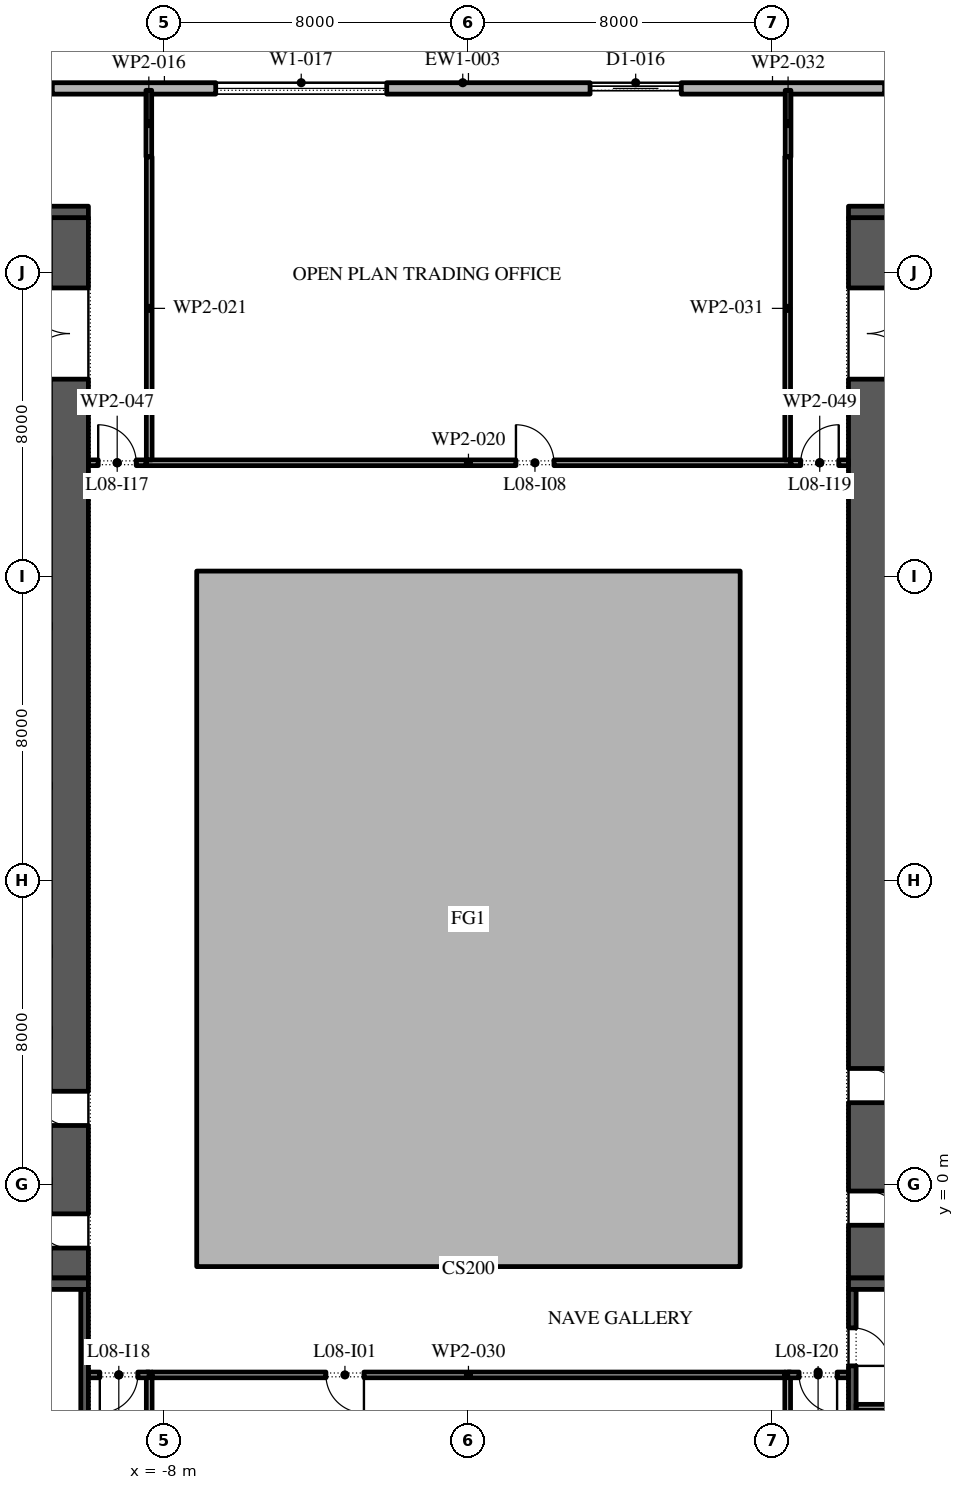
"""IFC4 building model, lengths in metres.
Left out: names, types, materials, properties, quantities, classifications, styles, units other than length and angle.
Written with IfcOpenShell. Run it as: python <this file> out.ifc"""

import sys

from ifc_helpers import new_model, si_unit, direction, frame, frame_2d, origin, place, context, subcontext, project, spatial, polyline, rectangle, outline, extrude, element, fill, save


model = new_model("IFC4")
c1 = context("Model", 3, precision=1e-05, world=origin(), true_north=direction((0.0, 1.0)))
c2 = subcontext(c1, "Body", "Model", "MODEL_VIEW")
j1 = project(units=[si_unit("LENGTHUNIT", "METRE"), si_unit("PLANEANGLEUNIT", "RADIAN")], contexts=[c1])
p1 = place(None, origin())
s1 = spatial("IfcSite", under=j1, at=p1, CompositionType="ELEMENT")
p2 = place(p1, origin())
s2 = spatial("IfcBuilding", under=s1, at=p2, CompositionType="ELEMENT")
p3 = place(p2, frame((0.0, 0.0, 43.8)))
s3 = spatial("IfcBuildingStorey", under=s2, at=p3, CompositionType="ELEMENT", Elevation=43.8)
p4 = place(p3, origin())
e1 = element("IfcWall", 1, at=p4, inside=s3, PredefinedType="STANDARD", context=c2, shape_type="SweptSolid", body=[
    extrude(outline(polyline([(-7.15, -2.15), (7.15, -2.15), (7.15, 16.15), (-7.15, 16.15), (-7.15, -2.15)]), holes=[polyline([(-7.0, -2.0), (-7.0, 16.0), (7.0, 16.0), (7.0, -2.0), (-7.0, -2.0)])]), origin(), (0.0, 0.0, 1.0), 4.0),
])
p5 = place(p3, frame((26.1, 28.85, 0.0), z_axis=(0.0, 0.0, 1.0), x_axis=(-1.0, 0.0, 0.0)))
e2 = element("IfcWall", 2, at=p5, inside=s3, PredefinedType="STANDARD", context=c2, shape_type="SweptSolid", body=[
    extrude(rectangle(XDim=52.5, YDim=0.3, at=frame_2d((26.25, 0.0))), origin(), (0.0, 0.0, 1.0), 4.0),
])
p6 = place(p5, frame((2.0, 0.0, 0.45)))
e3 = element("IfcOpeningElement", 3, at=p6, cuts=e2, PredefinedType="OPENING", context=c2, shape_type="SweptSolid", body=[
    extrude(rectangle(XDim=4.5, YDim=3.05, at=frame_2d((2.25, 1.525))), frame((0.0, 0.16, 0.0), z_axis=(0.0, -1.0, 0.0), x_axis=(1.0, 0.0, 0.0)), (0.0, 0.0, 1.0), 0.32),
])
p7 = place(p5, frame((10.65, 0.0, 0.45)))
e4 = element("IfcOpeningElement", 4, at=p7, cuts=e2, PredefinedType="OPENING", context=c2, shape_type="SweptSolid", body=[
    extrude(rectangle(XDim=4.5, YDim=3.05, at=frame_2d((2.25, 1.525))), frame((0.0, 0.16, 0.0), z_axis=(0.0, -1.0, 0.0), x_axis=(1.0, 0.0, 0.0)), (0.0, 0.0, 1.0), 0.32),
])
p8 = place(p5, frame((20.5, 0.0, 0.0)))
e5 = element("IfcOpeningElement", 5, at=p8, cuts=e2, PredefinedType="OPENING", context=c2, shape_type="SweptSolid", body=[
    extrude(rectangle(XDim=2.4, YDim=3.5, at=frame_2d((1.2, 1.75))), frame((0.0, 0.16, 0.0), z_axis=(0.0, -1.0, 0.0), x_axis=(1.0, 0.0, 0.0)), (0.0, 0.0, 1.0), 0.32),
])
p9 = place(p5, frame((28.25, 0.0, 0.45)))
e6 = element("IfcOpeningElement", 6, at=p9, cuts=e2, PredefinedType="OPENING", context=c2, shape_type="SweptSolid", body=[
    extrude(rectangle(XDim=4.5, YDim=3.05, at=frame_2d((2.25, 1.525))), frame((0.0, 0.16, 0.0), z_axis=(0.0, -1.0, 0.0), x_axis=(1.0, 0.0, 0.0)), (0.0, 0.0, 1.0), 0.32),
])
p10 = place(p5, frame((37.05, 0.0, 0.45)))
e7 = element("IfcOpeningElement", 7, at=p10, cuts=e2, PredefinedType="OPENING", context=c2, shape_type="SweptSolid", body=[
    extrude(rectangle(XDim=4.5, YDim=3.05, at=frame_2d((2.25, 1.525))), frame((0.0, 0.16, 0.0), z_axis=(0.0, -1.0, 0.0), x_axis=(1.0, 0.0, 0.0)), (0.0, 0.0, 1.0), 0.32),
])
p11 = place(p5, frame((45.85, 0.0, 0.45)))
e8 = element("IfcOpeningElement", 8, at=p11, cuts=e2, PredefinedType="OPENING", context=c2, shape_type="SweptSolid", body=[
    extrude(rectangle(XDim=4.5, YDim=3.05, at=frame_2d((2.25, 1.525))), frame((0.0, 0.16, 0.0), z_axis=(0.0, -1.0, 0.0), x_axis=(1.0, 0.0, 0.0)), (0.0, 0.0, 1.0), 0.32),
])
p12 = place(p3, frame((-10.5, -2.45, 0.0), z_axis=(0.0, 0.0, 1.0), x_axis=(0.0, 1.0, 0.0)))
e9 = element("IfcWall", 9, at=p12, inside=s3, PredefinedType="SHEAR", context=c2, shape_type="SweptSolid", body=[
    extrude(rectangle(XDim=27.9, YDim=1.0, at=frame_2d((13.95, 0.0))), origin(), (0.0, 0.0, 1.0), 4.0),
])
p13 = place(p12, frame((23.65, 0.0, 0.0)))
e10 = element("IfcOpeningElement", 10, at=p13, cuts=e9, PredefinedType="OPENING", context=c2, shape_type="SweptSolid", body=[
    extrude(rectangle(XDim=2.4, YDim=2.1, at=frame_2d((1.2, 1.05))), frame((0.0, 0.51, 0.0), z_axis=(0.0, -1.0, 0.0), x_axis=(1.0, 0.0, 0.0)), (0.0, 0.0, 1.0), 1.02),
])
p14 = place(p12, frame((0.788, 0.0, 0.0)))
e11 = element("IfcOpeningElement", 11, at=p14, cuts=e9, PredefinedType="OPENING", context=c2, shape_type="SweptSolid", body=[
    extrude(rectangle(XDim=0.9, YDim=2.1, at=frame_2d((0.45, 1.05))), frame((0.0, 0.51, 0.0), z_axis=(0.0, -1.0, 0.0), x_axis=(1.0, 0.0, 0.0)), (0.0, 0.0, 1.0), 1.02),
])
p15 = place(p12, frame((4.012, 0.0, 0.0)))
e12 = element("IfcOpeningElement", 12, at=p15, cuts=e9, PredefinedType="OPENING", context=c2, shape_type="SweptSolid", body=[
    extrude(rectangle(XDim=0.9, YDim=2.1, at=frame_2d((0.45, 1.05))), frame((0.0, 0.51, 0.0), z_axis=(0.0, -1.0, 0.0), x_axis=(1.0, 0.0, 0.0)), (0.0, 0.0, 1.0), 1.02),
])
for number, where, z_axis, x_axis in (
    (13, (-22.0, -2.6, 0.0), (0.0, 0.0, 1.0), (1.0, 0.0, 0.0)),
    (14, (-22.0, 25.6, 0.0), (0.0, 0.0, 1.0), (1.0, 0.0, 0.0)),
):
    element("IfcWall", number, at=place(p3, frame(where, z_axis=z_axis, x_axis=x_axis)), inside=s3, PredefinedType="SHEAR", context=c2, shape_type="SweptSolid", body=[
        extrude(rectangle(XDim=12.0, YDim=0.3, at=frame_2d((6.0, 0.0))), origin(), (0.0, 0.0, 1.0), 4.0),
    ])
p16 = place(p3, frame((-10.1, -15.8, 0.0), z_axis=(0.0, 0.0, 1.0), x_axis=(0.0, 1.0, 0.0)))
e15 = element("IfcWall", 15, at=p16, inside=s3, PredefinedType="SHEAR", context=c2, shape_type="SweptSolid", body=[
    extrude(rectangle(XDim=13.05, YDim=0.2, at=frame_2d((6.525, 0.0))), origin(), (0.0, 0.0, 1.0), 4.0),
])
p17 = place(p16, frame((6.075, 0.0, 0.0)))
e16 = element("IfcOpeningElement", 16, at=p17, cuts=e15, PredefinedType="OPENING", context=c2, shape_type="SweptSolid", body=[
    extrude(rectangle(XDim=0.9, YDim=2.1, at=frame_2d((0.45, 1.05))), frame((0.0, 0.11, 0.0), z_axis=(0.0, -1.0, 0.0), x_axis=(1.0, 0.0, 0.0)), (0.0, 0.0, 1.0), 0.22),
])
p18 = place(p3, frame((10.5, -2.45, 0.0), z_axis=(0.0, 0.0, 1.0), x_axis=(0.0, 1.0, 0.0)))
e17 = element("IfcWall", 17, at=p18, inside=s3, PredefinedType="SHEAR", context=c2, shape_type="SweptSolid", body=[
    extrude(rectangle(XDim=27.9, YDim=1.0, at=frame_2d((13.95, 0.0))), origin(), (0.0, 0.0, 1.0), 4.0),
])
p19 = place(p18, frame((23.65, 0.0, 0.0)))
e18 = element("IfcOpeningElement", 18, at=p19, cuts=e17, PredefinedType="OPENING", context=c2, shape_type="SweptSolid", body=[
    extrude(rectangle(XDim=2.4, YDim=2.1, at=frame_2d((1.2, 1.05))), frame((0.0, 0.51, 0.0), z_axis=(0.0, -1.0, 0.0), x_axis=(1.0, 0.0, 0.0)), (0.0, 0.0, 1.0), 1.02),
])
p20 = place(p18, frame((1.387, 0.0, 0.0)))
e19 = element("IfcOpeningElement", 19, at=p20, cuts=e17, PredefinedType="OPENING", context=c2, shape_type="SweptSolid", body=[
    extrude(rectangle(XDim=0.9, YDim=2.1, at=frame_2d((0.45, 1.05))), frame((0.0, 0.51, 0.0), z_axis=(0.0, -1.0, 0.0), x_axis=(1.0, 0.0, 0.0)), (0.0, 0.0, 1.0), 1.02),
])
p21 = place(p18, frame((4.613, 0.0, 0.0)))
e20 = element("IfcOpeningElement", 20, at=p21, cuts=e17, PredefinedType="OPENING", context=c2, shape_type="SweptSolid", body=[
    extrude(rectangle(XDim=0.9, YDim=2.1, at=frame_2d((0.45, 1.05))), frame((0.0, 0.51, 0.0), z_axis=(0.0, -1.0, 0.0), x_axis=(1.0, 0.0, 0.0)), (0.0, 0.0, 1.0), 1.02),
])
for number, where, z_axis, x_axis in (
    (21, (10.0, -2.6, 0.0), (0.0, 0.0, 1.0), (1.0, 0.0, 0.0)),
    (22, (10.0, 25.6, 0.0), (0.0, 0.0, 1.0), (1.0, 0.0, 0.0)),
):
    element("IfcWall", number, at=place(p3, frame(where, z_axis=z_axis, x_axis=x_axis)), inside=s3, PredefinedType="SHEAR", context=c2, shape_type="SweptSolid", body=[
        extrude(rectangle(XDim=12.0, YDim=0.3, at=frame_2d((6.0, 0.0))), origin(), (0.0, 0.0, 1.0), 4.0),
    ])
p22 = place(p3, frame((10.1, -15.8, 0.0), z_axis=(0.0, 0.0, 1.0), x_axis=(0.0, 1.0, 0.0)))
e23 = element("IfcWall", 23, at=p22, inside=s3, PredefinedType="SHEAR", context=c2, shape_type="SweptSolid", body=[
    extrude(rectangle(XDim=13.05, YDim=0.2, at=frame_2d((6.525, 0.0))), origin(), (0.0, 0.0, 1.0), 4.0),
])
p23 = place(p22, frame((4.488, 0.0, 0.0)))
e24 = element("IfcOpeningElement", 24, at=p23, cuts=e23, PredefinedType="OPENING", context=c2, shape_type="SweptSolid", body=[
    extrude(rectangle(XDim=0.9, YDim=2.1, at=frame_2d((0.45, 1.05))), frame((0.0, 0.11, 0.0), z_axis=(0.0, -1.0, 0.0), x_axis=(1.0, 0.0, 0.0)), (0.0, 0.0, 1.0), 0.22),
])
p24 = place(p22, frame((11.038, 0.0, 0.0)))
e25 = element("IfcOpeningElement", 25, at=p24, cuts=e23, PredefinedType="OPENING", context=c2, shape_type="SweptSolid", body=[
    extrude(rectangle(XDim=1.0, YDim=2.1, at=frame_2d((0.5, 1.05))), frame((0.0, 0.11, 0.0), z_axis=(0.0, -1.0, 0.0), x_axis=(1.0, 0.0, 0.0)), (0.0, 0.0, 1.0), 0.22),
])
p25 = place(p3, frame((10.2, -5.85, 0.0), z_axis=(0.0, 0.0, 1.0), x_axis=(1.0, 0.0, 0.0)))
e26 = element("IfcWall", 26, at=p25, inside=s3, PredefinedType="PARTITIONING", context=c2, shape_type="SweptSolid", body=[
    extrude(rectangle(XDim=11.6, YDim=0.15, at=frame_2d((5.8, 0.0))), origin(), (0.0, 0.0, 1.0), 4.0),
])
p26 = place(p3, frame((-8.41, 28.8, 0.0), z_axis=(0.0, 0.0, 1.0), x_axis=(0.0, -1.0, 0.0)))
e27 = element("IfcWall", 27, at=p26, inside=s3, PredefinedType="PARTITIONING", context=c2, shape_type="SweptSolid", body=[
    extrude(rectangle(XDim=1.75, YDim=0.15, at=frame_2d((0.875, 0.0))), origin(), (0.0, 0.0, 1.0), 4.0),
])
p27 = place(p3, frame((-8.4, -4.925, 0.0), z_axis=(0.0, 0.0, 1.0), x_axis=(0.0, -1.0, 0.0)))
e28 = element("IfcWall", 28, at=p27, inside=s3, PredefinedType="PARTITIONING", context=c2, shape_type="SweptSolid", body=[
    extrude(rectangle(XDim=5.195, YDim=0.15, at=frame_2d((2.598, 0.0))), origin(), (0.0, 0.0, 1.0), 4.0),
])
p28 = place(p3, frame((-8.475, 19.0, 0.0), z_axis=(0.0, 0.0, 1.0), x_axis=(1.0, 0.0, 0.0)))
e29 = element("IfcWall", 29, at=p28, inside=s3, PredefinedType="PARTITIONING", context=c2, shape_type="SweptSolid", body=[
    extrude(rectangle(XDim=16.95, YDim=0.15, at=frame_2d((8.475, 0.0))), origin(), (0.0, 0.0, 1.0), 4.0),
])
p29 = place(p28, frame((9.725, 0.0, 0.0)))
e30 = element("IfcOpeningElement", 30, at=p29, cuts=e29, PredefinedType="OPENING", context=c2, shape_type="SweptSolid", body=[
    extrude(rectangle(XDim=1.0, YDim=2.1, at=frame_2d((0.5, 1.05))), frame((0.0, 0.085, 0.0), z_axis=(0.0, -1.0, 0.0), x_axis=(1.0, 0.0, 0.0)), (0.0, 0.0, 1.0), 0.17),
])
p30 = place(p3, frame((-8.4, 27.05, 0.0), z_axis=(0.0, 0.0, 1.0), x_axis=(0.0, -1.0, 0.0)))
e31 = element("IfcWall", 31, at=p30, inside=s3, PredefinedType="PARTITIONING", context=c2, shape_type="SweptSolid", body=[
    extrude(rectangle(XDim=7.975, YDim=0.15, at=frame_2d((3.988, 0.0))), origin(), (0.0, 0.0, 1.0), 4.0),
])
p31 = place(p3, frame((8.4, -10.12, 0.0), z_axis=(0.0, 0.0, 1.0), x_axis=(0.0, 1.0, 0.0)))
e32 = element("IfcWall", 32, at=p31, inside=s3, PredefinedType="PARTITIONING", context=c2, shape_type="SweptSolid", body=[
    extrude(rectangle(XDim=5.195, YDim=0.15, at=frame_2d((2.598, 0.0))), origin(), (0.0, 0.0, 1.0), 4.0),
])
p32 = place(p3, frame((8.325, -5.0, 0.0), z_axis=(0.0, 0.0, 1.0), x_axis=(-1.0, 0.0, 0.0)))
e33 = element("IfcWall", 33, at=p32, inside=s3, PredefinedType="PARTITIONING", context=c2, shape_type="SweptSolid", body=[
    extrude(rectangle(XDim=16.65, YDim=0.15, at=frame_2d((8.325, 0.0))), origin(), (0.0, 0.0, 1.0), 4.0),
])
p33 = place(p32, frame((11.075, 0.0, 0.0)))
e34 = element("IfcOpeningElement", 34, at=p33, cuts=e33, PredefinedType="OPENING", context=c2, shape_type="SweptSolid", body=[
    extrude(rectangle(XDim=1.0, YDim=2.1, at=frame_2d((0.5, 1.05))), frame((0.0, 0.085, 0.0), z_axis=(0.0, -1.0, 0.0), x_axis=(1.0, 0.0, 0.0)), (0.0, 0.0, 1.0), 0.17),
])
p34 = place(p3, frame((8.4, 19.075, 0.0), z_axis=(0.0, 0.0, 1.0), x_axis=(0.0, 1.0, 0.0)))
e35 = element("IfcWall", 35, at=p34, inside=s3, PredefinedType="PARTITIONING", context=c2, shape_type="SweptSolid", body=[
    extrude(rectangle(XDim=7.975, YDim=0.15, at=frame_2d((3.988, 0.0))), origin(), (0.0, 0.0, 1.0), 4.0),
])
p35 = place(p3, frame((8.41, 27.05, 0.0), z_axis=(0.0, 0.0, 1.0), x_axis=(0.0, 1.0, 0.0)))
e36 = element("IfcWall", 36, at=p35, inside=s3, PredefinedType="PARTITIONING", context=c2, shape_type="SweptSolid", body=[
    extrude(rectangle(XDim=1.75, YDim=0.15, at=frame_2d((0.875, 0.0))), origin(), (0.0, 0.0, 1.0), 4.0),
])
p36 = place(p3, frame((-10.0, 19.0, 0.0), z_axis=(0.0, 0.0, 1.0), x_axis=(1.0, 0.0, 0.0)))
e37 = element("IfcWall", 37, at=p36, inside=s3, PredefinedType="PARTITIONING", context=c2, shape_type="SweptSolid", body=[
    extrude(rectangle(XDim=1.515, YDim=0.15, at=frame_2d((0.757, 0.0))), origin(), (0.0, 0.0, 1.0), 4.0),
])
p37 = place(p36, frame((0.258, 0.0, 0.0)))
e38 = element("IfcOpeningElement", 38, at=p37, cuts=e37, PredefinedType="OPENING", context=c2, shape_type="SweptSolid", body=[
    extrude(rectangle(XDim=1.0, YDim=2.1, at=frame_2d((0.5, 1.05))), frame((0.0, 0.085, 0.0), z_axis=(0.0, -1.0, 0.0), x_axis=(1.0, 0.0, 0.0)), (0.0, 0.0, 1.0), 0.17),
])
p38 = place(p3, frame((-8.4, -5.0, 0.0), z_axis=(0.0, 0.0, 1.0), x_axis=(-1.0, 0.0, 0.0)))
e39 = element("IfcWall", 39, at=p38, inside=s3, PredefinedType="PARTITIONING", context=c2, shape_type="SweptSolid", body=[
    extrude(rectangle(XDim=1.6, YDim=0.15, at=frame_2d((0.8, 0.0))), origin(), (0.0, 0.0, 1.0), 4.0),
])
p39 = place(p38, frame((0.3, 0.0, 0.0)))
e40 = element("IfcOpeningElement", 40, at=p39, cuts=e39, PredefinedType="OPENING", context=c2, shape_type="SweptSolid", body=[
    extrude(rectangle(XDim=1.0, YDim=2.1, at=frame_2d((0.5, 1.05))), frame((0.0, 0.085, 0.0), z_axis=(0.0, -1.0, 0.0), x_axis=(1.0, 0.0, 0.0)), (0.0, 0.0, 1.0), 0.17),
])
p40 = place(p3, frame((8.485, 19.0, 0.0), z_axis=(0.0, 0.0, 1.0), x_axis=(1.0, 0.0, 0.0)))
e41 = element("IfcWall", 41, at=p40, inside=s3, PredefinedType="PARTITIONING", context=c2, shape_type="SweptSolid", body=[
    extrude(rectangle(XDim=1.515, YDim=0.15, at=frame_2d((0.757, 0.0))), origin(), (0.0, 0.0, 1.0), 4.0),
])
p41 = place(p40, frame((0.258, 0.0, 0.0)))
e42 = element("IfcOpeningElement", 42, at=p41, cuts=e41, PredefinedType="OPENING", context=c2, shape_type="SweptSolid", body=[
    extrude(rectangle(XDim=1.0, YDim=2.1, at=frame_2d((0.5, 1.05))), frame((0.0, 0.085, 0.0), z_axis=(0.0, -1.0, 0.0), x_axis=(1.0, 0.0, 0.0)), (0.0, 0.0, 1.0), 0.17),
])
p42 = place(p3, frame((10.0, -5.0, 0.0), z_axis=(0.0, 0.0, 1.0), x_axis=(-1.0, 0.0, 0.0)))
e43 = element("IfcWall", 43, at=p42, inside=s3, PredefinedType="PARTITIONING", context=c2, shape_type="SweptSolid", body=[
    extrude(rectangle(XDim=1.6, YDim=0.15, at=frame_2d((0.8, 0.0))), origin(), (0.0, 0.0, 1.0), 4.0),
])
p43 = place(p42, frame((0.3, 0.0, 0.0)))
e44 = element("IfcOpeningElement", 44, at=p43, cuts=e43, PredefinedType="OPENING", context=c2, shape_type="SweptSolid", body=[
    extrude(rectangle(XDim=1.0, YDim=2.1, at=frame_2d((0.5, 1.05))), frame((0.0, 0.085, 0.0), z_axis=(0.0, -1.0, 0.0), x_axis=(1.0, 0.0, 0.0)), (0.0, 0.0, 1.0), 0.17),
])
p44 = place(p8, origin())
e45 = element("IfcDoor", 45, at=p44, inside=s3, OperationType="DOUBLE_DOOR_SLIDING", PredefinedType="DOOR", context=c2, shape_type="SweptSolid", body=[
    extrude(rectangle(XDim=2.4, YDim=3.5, at=frame_2d((1.2, 1.75))), frame((0.0, 0.025, 0.0), z_axis=(0.0, -1.0, 0.0), x_axis=(1.0, 0.0, 0.0)), (0.0, 0.0, 1.0), 0.05),
])
fill(e5, e45)
p45 = place(p9, origin())
e46 = element("IfcWindow", 46, at=p45, inside=s3, PartitioningType="DOUBLE_PANEL_VERTICAL", PredefinedType="WINDOW", context=c2, shape_type="SweptSolid", body=[
    extrude(rectangle(XDim=4.5, YDim=3.05, at=frame_2d((2.25, 1.525))), frame((0.0, 0.03, 0.0), z_axis=(0.0, -1.0, 0.0), x_axis=(1.0, 0.0, 0.0)), (0.0, 0.0, 1.0), 0.06),
])
fill(e6, e46)
p46 = place(p13, origin())
e47 = element("IfcDoor", 47, at=p46, inside=s3, OperationType="DOUBLE_DOOR_SINGLE_SWING", PredefinedType="DOOR", context=c2, shape_type="SweptSolid", body=[
    extrude(rectangle(XDim=2.4, YDim=2.1, at=frame_2d((1.2, 1.05))), frame((0.0, 0.025, 0.0), z_axis=(0.0, -1.0, 0.0), x_axis=(1.0, 0.0, 0.0)), (0.0, 0.0, 1.0), 0.05),
])
fill(e10, e47)
p47 = place(p19, frame((2.4, 0.0, 0.0), z_axis=(0.0, 0.0, 1.0), x_axis=(-1.0, 0.0, 0.0)))
e48 = element("IfcDoor", 48, at=p47, inside=s3, OperationType="DOUBLE_DOOR_SINGLE_SWING", PredefinedType="DOOR", context=c2, shape_type="SweptSolid", body=[
    extrude(rectangle(XDim=2.4, YDim=2.1, at=frame_2d((1.2, 1.05))), frame((0.0, 0.025, 0.0), z_axis=(0.0, -1.0, 0.0), x_axis=(1.0, 0.0, 0.0)), (0.0, 0.0, 1.0), 0.05),
])
fill(e18, e48)
p48 = place(p24, frame((1.0, -0.15, 0.0), z_axis=(0.0, 0.0, 1.0), x_axis=(-1.0, 0.0, 0.0)))
e49 = element("IfcDoor", 49, at=p48, inside=s3, OperationType="SINGLE_SWING_LEFT", PredefinedType="DOOR", context=c2, shape_type="SweptSolid", body=[
    extrude(rectangle(XDim=1.0, YDim=2.1, at=frame_2d((0.5, 1.05))), frame((0.0, -0.05, 0.0), z_axis=(0.0, -1.0, 0.0), x_axis=(1.0, 0.0, 0.0)), (0.0, 0.0, 1.0), 0.05),
])
fill(e25, e49)
p49 = place(p33, origin())
e50 = element("IfcDoor", 50, at=p49, inside=s3, OperationType="SINGLE_SWING_RIGHT", PredefinedType="DOOR", context=c2, shape_type="SweptSolid", body=[
    extrude(rectangle(XDim=1.0, YDim=2.1, at=frame_2d((0.5, 1.05))), frame((0.0, 0.025, 0.0), z_axis=(0.0, -1.0, 0.0), x_axis=(1.0, 0.0, 0.0)), (0.0, 0.0, 1.0), 0.05),
])
fill(e34, e50)
p50 = place(p29, origin())
e51 = element("IfcDoor", 51, at=p50, inside=s3, OperationType="SINGLE_SWING_RIGHT", PredefinedType="DOOR", context=c2, shape_type="SweptSolid", body=[
    extrude(rectangle(XDim=1.0, YDim=2.1, at=frame_2d((0.5, 1.05))), frame((0.0, 0.025, 0.0), z_axis=(0.0, -1.0, 0.0), x_axis=(1.0, 0.0, 0.0)), (0.0, 0.0, 1.0), 0.05),
])
fill(e30, e51)
p51 = place(p37, origin())
e52 = element("IfcDoor", 52, at=p51, inside=s3, OperationType="SINGLE_SWING_RIGHT", PredefinedType="DOOR", context=c2, shape_type="SweptSolid", body=[
    extrude(rectangle(XDim=1.0, YDim=2.1, at=frame_2d((0.5, 1.05))), frame((0.0, 0.025, 0.0), z_axis=(0.0, -1.0, 0.0), x_axis=(1.0, 0.0, 0.0)), (0.0, 0.0, 1.0), 0.05),
])
fill(e38, e52)
p52 = place(p39, origin())
e53 = element("IfcDoor", 53, at=p52, inside=s3, OperationType="SINGLE_SWING_LEFT", PredefinedType="DOOR", context=c2, shape_type="SweptSolid", body=[
    extrude(rectangle(XDim=1.0, YDim=2.1, at=frame_2d((0.5, 1.05))), frame((0.0, 0.025, 0.0), z_axis=(0.0, -1.0, 0.0), x_axis=(1.0, 0.0, 0.0)), (0.0, 0.0, 1.0), 0.05),
])
fill(e40, e53)
p53 = place(p41, origin())
e54 = element("IfcDoor", 54, at=p53, inside=s3, OperationType="SINGLE_SWING_LEFT", PredefinedType="DOOR", context=c2, shape_type="SweptSolid", body=[
    extrude(rectangle(XDim=1.0, YDim=2.1, at=frame_2d((0.5, 1.05))), frame((0.0, 0.025, 0.0), z_axis=(0.0, -1.0, 0.0), x_axis=(1.0, 0.0, 0.0)), (0.0, 0.0, 1.0), 0.05),
])
fill(e42, e54)
p54 = place(p43, origin())
e55 = element("IfcDoor", 55, at=p54, inside=s3, OperationType="SINGLE_SWING_RIGHT", PredefinedType="DOOR", context=c2, shape_type="SweptSolid", body=[
    extrude(rectangle(XDim=1.0, YDim=2.1, at=frame_2d((0.5, 1.05))), frame((0.0, 0.025, 0.0), z_axis=(0.0, -1.0, 0.0), x_axis=(1.0, 0.0, 0.0)), (0.0, 0.0, 1.0), 0.05),
])
fill(e44, e55)
save(model, sys.argv[1])
